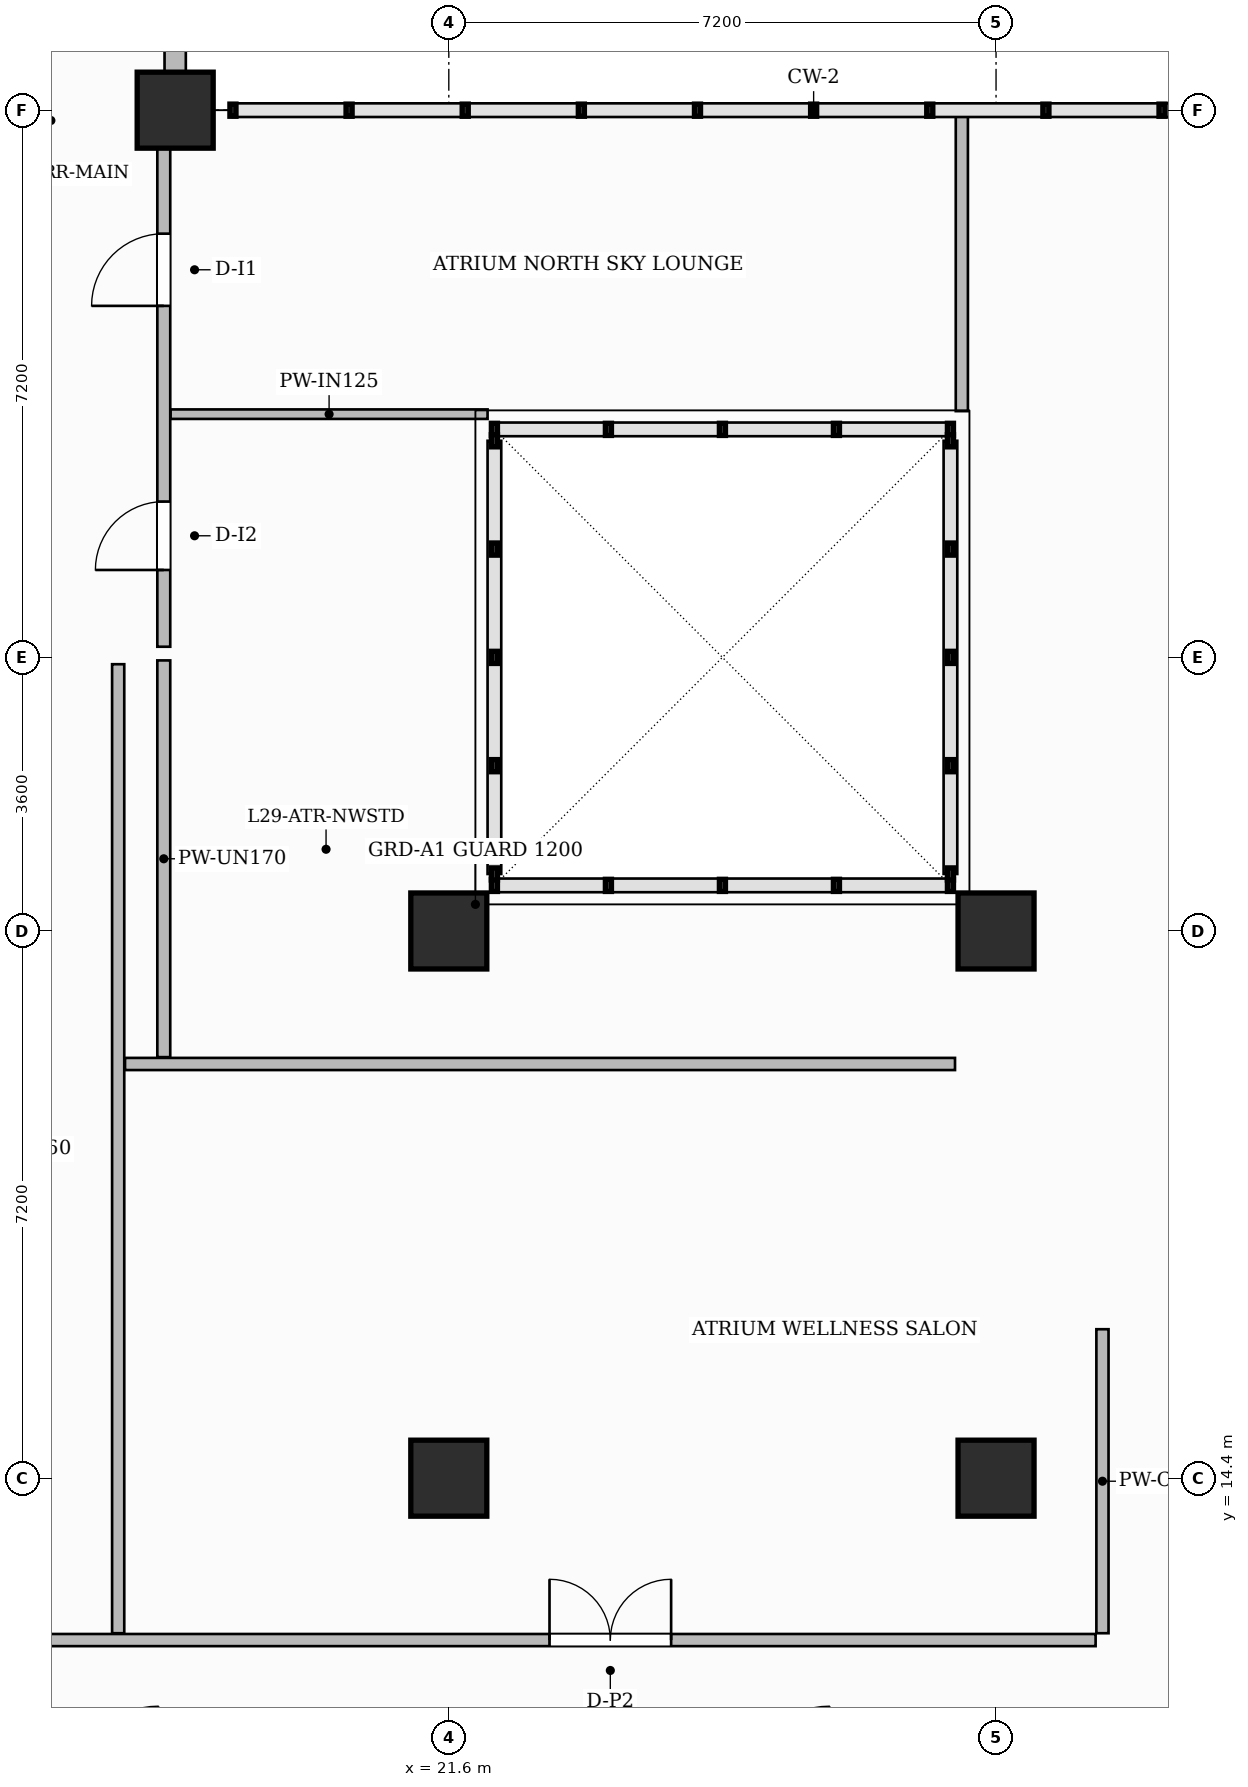
"""IFC4 building model, lengths in metres.
Left out: names, types, materials, properties, quantities, classifications, styles, units other than length and angle.
Written with IfcOpenShell. Run it as: python <this file> out.ifc"""

import sys

from ifc_helpers import new_model, si_unit, direction, frame, frame_2d, origin, origin_2d, place, context, subcontext, project, spatial, rectangle, extrude, source, transform, mapped, element, fill, save


model = new_model("IFC4")
c1 = context("Model", 3, precision=1e-05, world=origin(), true_north=direction((0.0, 1.0)))
c2 = subcontext(c1, "Body", "Model", "MODEL_VIEW")
j1 = project(units=[si_unit("LENGTHUNIT", "METRE"), si_unit("PLANEANGLEUNIT", "RADIAN")], contexts=[c1])
p1 = place(None, origin())
s1 = spatial("IfcSite", under=j1, at=p1, CompositionType="ELEMENT")
p2 = place(p1, origin())
s2 = spatial("IfcBuilding", under=s1, at=p2, CompositionType="ELEMENT")
p3 = place(p2, frame((0.0, 0.0, 119.2)))
s3 = spatial("IfcBuildingStorey", under=s2, at=p3, CompositionType="ELEMENT", Elevation=119.2)
m1 = source(origin(), c2, "Body", "SweptSolid", [
    extrude(rectangle(XDim=1.0, YDim=1.0, at=origin_2d()), origin(), (0.0, 0.0, 1.0), 3.7),
])
for number, where, z_axis, x_axis in (
    (1, (21.6, 14.4, 0.0), (0.0, 0.0, 1.0), (1.0, 0.0, 0.0)),
    (2, (21.6, 21.6, 0.0), (0.0, 0.0, 1.0), (1.0, 0.0, 0.0)),
    (3, (28.8, 14.4, 0.0), (0.0, 0.0, 1.0), (1.0, 0.0, 0.0)),
    (4, (28.8, 21.6, 0.0), (0.0, 0.0, 1.0), (1.0, 0.0, 0.0)),
    (5, (18.0, 32.4, 0.0), (0.0, 0.0, 1.0), (1.0, 0.0, 0.0)),
):
    element("IfcColumn", number, at=place(p3, frame(where, z_axis=z_axis, x_axis=x_axis)), inside=s3, PredefinedType="COLUMN", context=c2, shape_type="MappedRepresentation", body=[
        mapped(m1, transform((0.0, 0.0, 0.0), scale=1.0)),
    ])
p4 = place(p3, frame((14.548, 12.27, 0.0), z_axis=(0.0, 0.0, 1.0), x_axis=(1.0, 0.0, 0.0)))
e6 = element("IfcWall", 6, at=p4, inside=s3, PredefinedType="PARTITIONING", context=c2, shape_type="SweptSolid", body=[
    extrude(rectangle(XDim=15.562, YDim=0.16, at=frame_2d((7.781, 0.0))), origin(), (0.0, 0.0, 1.0), 3.45),
])
p5 = place(p4, frame((8.377, 0.0, 0.0)))
e7 = element("IfcOpeningElement", 7, at=p5, cuts=e6, PredefinedType="OPENING", context=c2, shape_type="SweptSolid", body=[
    extrude(rectangle(XDim=1.6, YDim=2.4, at=frame_2d((0.8, 1.2))), frame((0.0, 0.09, 0.0), z_axis=(0.0, -1.0, 0.0), x_axis=(1.0, 0.0, 0.0)), (0.0, 0.0, 1.0), 0.18),
])
p6 = place(p3, frame((30.2, 12.36, 0.0), z_axis=(0.0, 0.0, 1.0), x_axis=(0.0, 1.0, 0.0)))
e8 = element("IfcWall", 8, at=p6, inside=s3, PredefinedType="PARTITIONING", context=c2, shape_type="SweptSolid", body=[
    extrude(rectangle(XDim=4.0, YDim=0.16, at=frame_2d((2.0, 0.0))), origin(), (0.0, 0.0, 1.0), 3.45),
])
p7 = place(p3, frame((17.25, 12.36, 0.0), z_axis=(0.0, 0.0, 1.0), x_axis=(0.0, 1.0, 0.0)))
e9 = element("IfcWall", 9, at=p7, inside=s3, PredefinedType="PARTITIONING", context=c2, shape_type="SweptSolid", body=[
    extrude(rectangle(XDim=12.75, YDim=0.16, at=frame_2d((6.375, 0.0))), origin(), (0.0, 0.0, 1.0), 3.45),
])
p8 = place(p3, frame((17.85, 19.94, 0.0), z_axis=(0.0, 0.0, 1.0), x_axis=(0.0, 1.0, 0.0)))
e10 = element("IfcWall", 10, at=p8, inside=s3, PredefinedType="PARTITIONING", context=c2, shape_type="SweptSolid", body=[
    extrude(rectangle(XDim=5.22, YDim=0.17, at=frame_2d((2.61, 0.0))), origin(), (0.0, 0.0, 1.0), 3.105),
])
p9 = place(p3, frame((17.85, 25.34, 0.0), z_axis=(0.0, 0.0, 1.0), x_axis=(0.0, 1.0, 0.0)))
e11 = element("IfcWall", 11, at=p9, inside=s3, PredefinedType="PARTITIONING", context=c2, shape_type="SweptSolid", body=[
    extrude(rectangle(XDim=6.87, YDim=0.17, at=frame_2d((3.435, 0.0))), origin(), (0.0, 0.0, 1.0), 3.45),
])
p10 = place(p9, frame((1.01, 0.0, 0.0)))
e12 = element("IfcOpeningElement", 12, at=p10, cuts=e11, PredefinedType="OPENING", context=c2, shape_type="SweptSolid", body=[
    extrude(rectangle(XDim=0.9, YDim=2.15, at=frame_2d((0.45, 1.075))), frame((0.0, 0.095, 0.0), z_axis=(0.0, -1.0, 0.0), x_axis=(1.0, 0.0, 0.0)), (0.0, 0.0, 1.0), 0.19),
])
p11 = place(p9, frame((4.485, 0.0, 0.0)))
e13 = element("IfcOpeningElement", 13, at=p11, cuts=e11, PredefinedType="OPENING", context=c2, shape_type="SweptSolid", body=[
    extrude(rectangle(XDim=0.95, YDim=2.15, at=frame_2d((0.475, 1.075))), frame((0.0, 0.095, 0.0), z_axis=(0.0, -1.0, 0.0), x_axis=(1.0, 0.0, 0.0)), (0.0, 0.0, 1.0), 0.19),
])
p12 = place(p3, frame((28.35, 28.44, 0.0), z_axis=(0.0, 0.0, 1.0), x_axis=(0.0, 1.0, 0.0)))
e14 = element("IfcWall", 14, at=p12, inside=s3, PredefinedType="PARTITIONING", context=c2, shape_type="SweptSolid", body=[
    extrude(rectangle(XDim=3.932, YDim=0.16, at=frame_2d((1.966, 0.0))), origin(), (0.0, 0.0, 1.0), 3.45),
])
p13 = place(p3, frame((17.94, 28.4, 0.0), z_axis=(0.0, 0.0, 1.0), x_axis=(1.0, 0.0, 0.0)))
e15 = element("IfcWall", 15, at=p13, inside=s3, PredefinedType="PARTITIONING", context=c2, shape_type="SweptSolid", body=[
    extrude(rectangle(XDim=4.17, YDim=0.125, at=frame_2d((2.085, 0.0))), origin(), (0.0, 0.0, 1.0), 3.45),
])
p14 = place(p3, frame((17.34, 19.85, 0.0), z_axis=(0.0, 0.0, 1.0), x_axis=(1.0, 0.0, 0.0)))
e16 = element("IfcWall", 16, at=p14, inside=s3, PredefinedType="PARTITIONING", context=c2, shape_type="SweptSolid", body=[
    extrude(rectangle(XDim=10.92, YDim=0.16, at=frame_2d((5.46, 0.0))), origin(), (0.0, 0.0, 1.0), 3.45),
])
p15 = place(p3, frame((18.0, 32.4, 0.0), z_axis=(0.0, 0.0, 1.0), x_axis=(0.0, 1.0, 0.0)))
e17 = element("IfcWall", 17, at=p15, inside=s3, PredefinedType="SOLIDWALL", context=c2, shape_type="SweptSolid", body=[
    extrude(rectangle(XDim=14.35, YDim=0.28, at=frame_2d((7.175, 0.0))), origin(), (0.0, 0.0, 1.0), 3.45),
])
p16 = place(p15, frame((1.5, 0.0, 0.0)))
e18 = element("IfcOpeningElement", 18, at=p16, cuts=e17, PredefinedType="OPENING", context=c2, shape_type="SweptSolid", body=[
    extrude(rectangle(XDim=1.2, YDim=2.2, at=frame_2d((0.6, 1.1))), frame((0.0, 0.15, 0.0), z_axis=(0.0, -1.0, 0.0), x_axis=(1.0, 0.0, 0.0)), (0.0, 0.0, 1.0), 0.3),
])
p17 = place(p15, frame((3.8, 0.0, 0.8)))
e19 = element("IfcOpeningElement", 19, at=p17, cuts=e17, PredefinedType="OPENING", context=c2, shape_type="SweptSolid", body=[
    extrude(rectangle(XDim=1.8, YDim=1.85, at=frame_2d((0.9, 0.925))), frame((0.0, 0.15, 0.0), z_axis=(0.0, -1.0, 0.0), x_axis=(1.0, 0.0, 0.0)), (0.0, 0.0, 1.0), 0.3),
])
p18 = place(p15, frame((8.525, 0.0, 0.8)))
e20 = element("IfcOpeningElement", 20, at=p18, cuts=e17, PredefinedType="OPENING", context=c2, shape_type="SweptSolid", body=[
    extrude(rectangle(XDim=1.8, YDim=1.85, at=frame_2d((0.9, 0.925))), frame((0.0, 0.15, 0.0), z_axis=(0.0, -1.0, 0.0), x_axis=(1.0, 0.0, 0.0)), (0.0, 0.0, 1.0), 0.3),
])
p19 = place(p15, frame((11.275, 0.0, 0.8)))
e21 = element("IfcOpeningElement", 21, at=p19, cuts=e17, PredefinedType="OPENING", context=c2, shape_type="SweptSolid", body=[
    extrude(rectangle(XDim=1.8, YDim=1.85, at=frame_2d((0.9, 0.925))), frame((0.0, 0.15, 0.0), z_axis=(0.0, -1.0, 0.0), x_axis=(1.0, 0.0, 0.0)), (0.0, 0.0, 1.0), 0.3),
])
m2 = source(origin(), c2, "Body", "SweptSolid", [
    extrude(rectangle(XDim=0.9, YDim=2.15, at=frame_2d((0.45, 1.075))), frame((0.0, 0.025, 0.0), z_axis=(0.0, -1.0, 0.0), x_axis=(1.0, 0.0, 0.0)), (0.0, 0.0, 1.0), 0.05),
])
p20 = place(p10, origin())
e22 = element("IfcDoor", 22, at=p20, inside=s3, OperationType="SINGLE_SWING_LEFT", PredefinedType="DOOR", context=c2, shape_type="MappedRepresentation", body=[
    mapped(m2, transform((0.0, 0.0, 0.0), scale=1.0)),
])
fill(e12, e22)
m3 = source(origin(), c2, "Body", "SweptSolid", [
    extrude(rectangle(XDim=0.95, YDim=2.15, at=frame_2d((0.475, 1.075))), frame((0.0, 0.025, 0.0), z_axis=(0.0, -1.0, 0.0), x_axis=(1.0, 0.0, 0.0)), (0.0, 0.0, 1.0), 0.05),
])
p21 = place(p11, origin())
e23 = element("IfcDoor", 23, at=p21, inside=s3, OperationType="SINGLE_SWING_LEFT", PredefinedType="DOOR", context=c2, shape_type="MappedRepresentation", body=[
    mapped(m3, transform((0.0, 0.0, 0.0), scale=1.0)),
])
fill(e13, e23)
m4 = source(origin(), c2, "Body", "SweptSolid", [
    extrude(rectangle(XDim=1.6, YDim=2.4, at=frame_2d((0.8, 1.2))), frame((0.0, 0.025, 0.0), z_axis=(0.0, -1.0, 0.0), x_axis=(1.0, 0.0, 0.0)), (0.0, 0.0, 1.0), 0.05),
])
p22 = place(p5, origin())
e24 = element("IfcDoor", 24, at=p22, inside=s3, OperationType="DOUBLE_DOOR_SINGLE_SWING", PredefinedType="DOOR", context=c2, shape_type="MappedRepresentation", body=[
    mapped(m4, transform((0.0, 0.0, 0.0), scale=1.0)),
])
fill(e7, e24)
save(model, sys.argv[1])
